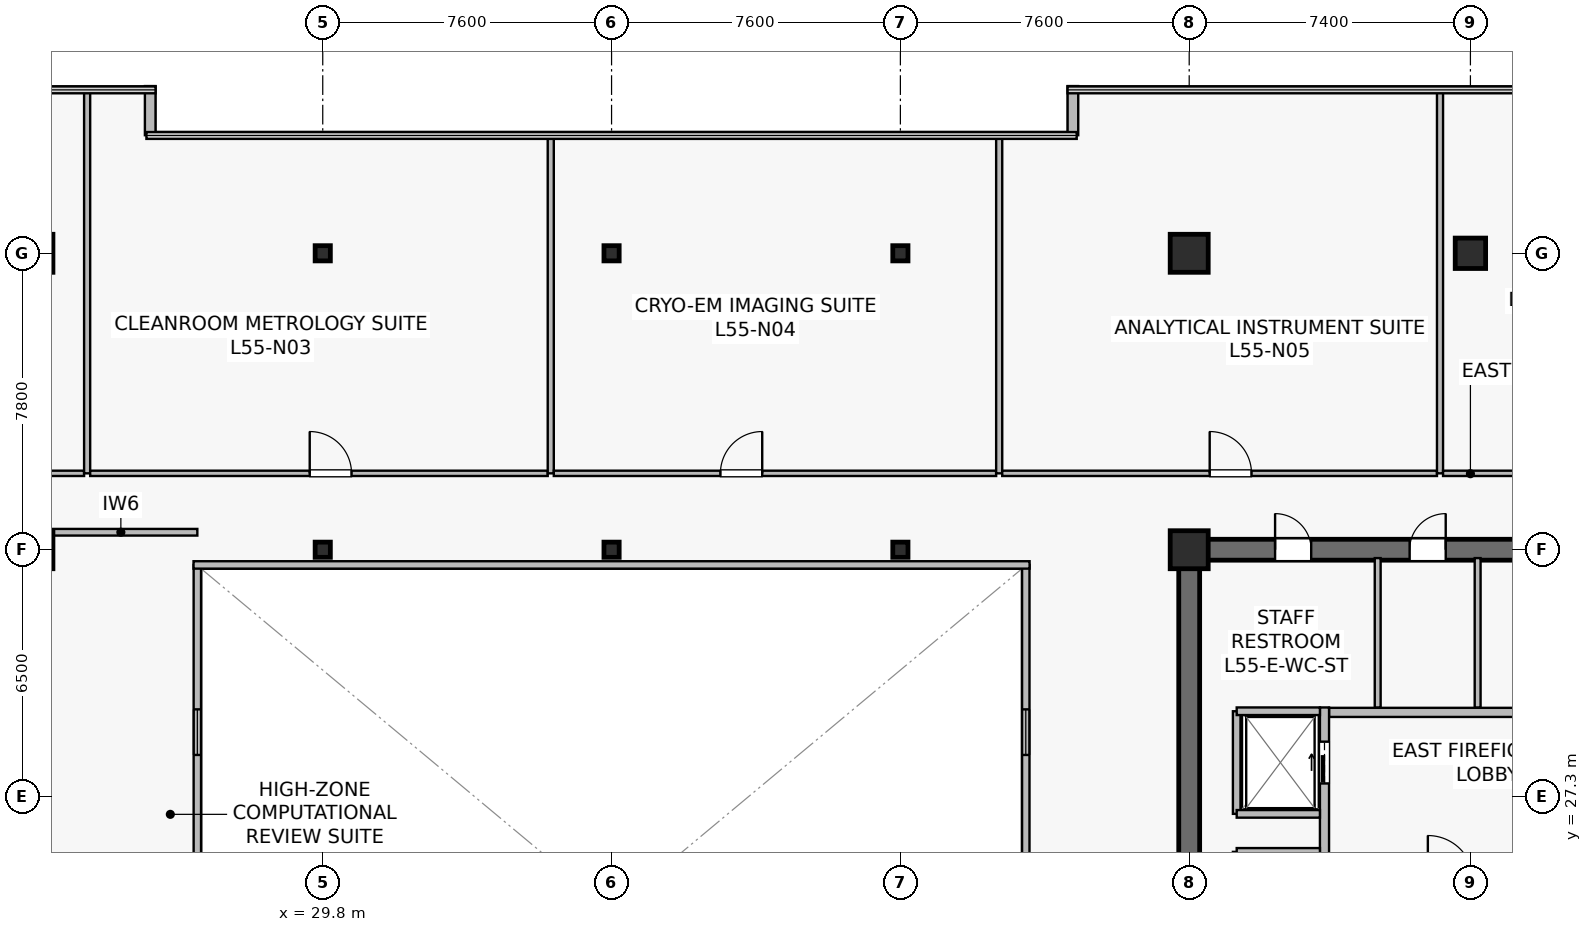
"""IFC4 building model, lengths in metres.
Left out: names, types, materials, properties, quantities, classifications, styles, units other than length and angle.
Written with IfcOpenShell. Run it as: python <this file> out.ifc"""

import sys

from ifc_helpers import new_model, si_unit, direction, frame, frame_2d, origin, origin_2d, place, context, subcontext, project, spatial, rectangle, hollow_rectangle, extrude, source, transform, mapped, element, fill, save


model = new_model("IFC4")
c1 = context("Model", 3, precision=1e-05, world=origin(), true_north=direction((0.0, 1.0)))
c2 = subcontext(c1, "Body", "Model", "MODEL_VIEW")
j1 = project(units=[si_unit("LENGTHUNIT", "METRE"), si_unit("PLANEANGLEUNIT", "RADIAN")], contexts=[c1])
p1 = place(None, origin())
s1 = spatial("IfcSite", under=j1, at=p1, CompositionType="ELEMENT")
p2 = place(p1, origin())
s2 = spatial("IfcBuilding", under=s1, at=p2, CompositionType="ELEMENT")
p3 = place(p2, frame((0.0, 0.0, 230.1)))
s3 = spatial("IfcBuildingStorey", under=s2, at=p3, CompositionType="ELEMENT", Elevation=230.1)
p4 = place(p3, frame((52.325, 33.8, 0.0), z_axis=(0.0, 0.0, 1.0), x_axis=(1.0, 0.0, 0.0)))
e1 = element("IfcWall", 1, at=p4, inside=s3, PredefinedType="SHEAR", context=c2, shape_type="SweptSolid", body=[
    extrude(rectangle(XDim=15.35, YDim=0.55, at=frame_2d((7.675, 0.0))), origin(), (0.0, 0.0, 1.0), 3.8),
])
p5 = place(p4, frame((6.075, 0.0, 0.0)))
e2 = element("IfcOpeningElement", 2, at=p5, cuts=e1, PredefinedType="OPENING", context=c2, shape_type="SweptSolid", body=[
    extrude(rectangle(XDim=0.95, YDim=2.15, at=frame_2d((0.475, 1.075))), frame((0.0, 0.285, 0.0), z_axis=(0.0, -1.0, 0.0), x_axis=(1.0, 0.0, 0.0)), (0.0, 0.0, 1.0), 0.57),
])
p6 = place(p4, frame((2.535, 0.0, 0.0)))
e3 = element("IfcOpeningElement", 3, at=p6, cuts=e1, PredefinedType="OPENING", context=c2, shape_type="SweptSolid", body=[
    extrude(rectangle(XDim=0.95, YDim=2.15, at=frame_2d((0.475, 1.075))), frame((0.0, 0.285, 0.0), z_axis=(0.0, -1.0, 0.0), x_axis=(1.0, 0.0, 0.0)), (0.0, 0.0, 1.0), 0.57),
])
p7 = place(p3, frame((52.6, 15.075, 0.0), z_axis=(0.0, 0.0, 1.0), x_axis=(0.0, 1.0, 0.0)))
e4 = element("IfcWall", 4, at=p7, inside=s3, PredefinedType="SHEAR", context=c2, shape_type="SweptSolid", body=[
    extrude(rectangle(XDim=18.45, YDim=0.55, at=frame_2d((9.225, 0.0))), origin(), (0.0, 0.0, 1.0), 3.8),
])
p8 = place(p7, frame((3.475, 0.0, 0.0)))
e5 = element("IfcOpeningElement", 5, at=p8, cuts=e4, PredefinedType="OPENING", context=c2, shape_type="SweptSolid", body=[
    extrude(rectangle(XDim=1.42, YDim=2.2, at=frame_2d((0.71, 1.1))), frame((0.0, 0.285, 0.0), z_axis=(0.0, -1.0, 0.0), x_axis=(1.0, 0.0, 0.0)), (0.0, 0.0, 1.0), 0.57),
])
m1 = source(origin(), c2, "Body", "SweptSolid", [
    extrude(rectangle(XDim=1.0, YDim=1.0, at=origin_2d()), origin(), (0.0, 0.0, 1.0), 4.1),
])
for number, where, z_axis, x_axis in (
    (6, (22.2, 33.8, 0.0), (0.0, 0.0, 1.0), (1.0, 0.0, 0.0)),
    (7, (22.2, 41.6, 0.0), (0.0, 0.0, 1.0), (1.0, 0.0, 0.0)),
    (8, (52.6, 33.8, 0.0), (0.0, 0.0, 1.0), (1.0, 0.0, 0.0)),
    (9, (52.6, 41.6, 0.0), (0.0, 0.0, 1.0), (1.0, 0.0, 0.0)),
):
    element("IfcColumn", number, at=place(p3, frame(where, z_axis=z_axis, x_axis=x_axis)), inside=s3, PredefinedType="COLUMN", context=c2, shape_type="MappedRepresentation", body=[
        mapped(m1, transform((0.0, 0.0, 0.0), scale=1.0)),
    ])
m2 = source(origin(), c2, "Body", "SweptSolid", [
    extrude(rectangle(XDim=0.8, YDim=0.8, at=origin_2d()), origin(), (0.0, 0.0, 1.0), 4.1),
])
p9 = place(p3, frame((60.0, 41.6, 0.0), z_axis=(0.0, 0.0, 1.0), x_axis=(1.0, 0.0, 0.0)))
e10 = element("IfcColumn", 10, at=p9, inside=s3, PredefinedType="COLUMN", context=c2, shape_type="MappedRepresentation", body=[
    mapped(m2, transform((0.0, 0.0, 0.0), scale=1.0)),
])
m3 = source(origin(), c2, "Body", "SweptSolid", [
    extrude(hollow_rectangle(XDim=0.4, YDim=0.4, WallThickness=0.019, at=origin_2d()), origin(), (0.0, 0.0, 1.0), 4.1),
])
for number, where, z_axis, x_axis in (
    (11, (29.8, 33.8, 0.0), (0.0, 0.0, 1.0), (1.0, 0.0, 0.0)),
    (12, (29.8, 41.6, 0.0), (0.0, 0.0, 1.0), (1.0, 0.0, 0.0)),
    (13, (37.4, 33.8, 0.0), (0.0, 0.0, 1.0), (1.0, 0.0, 0.0)),
    (14, (37.4, 41.6, 0.0), (0.0, 0.0, 1.0), (1.0, 0.0, 0.0)),
    (15, (45.0, 33.8, 0.0), (0.0, 0.0, 1.0), (1.0, 0.0, 0.0)),
    (16, (45.0, 41.6, 0.0), (0.0, 0.0, 1.0), (1.0, 0.0, 0.0)),
):
    element("IfcColumn", number, at=place(p3, frame(where, z_axis=z_axis, x_axis=x_axis)), inside=s3, PredefinedType="COLUMN", context=c2, shape_type="MappedRepresentation", body=[
        mapped(m3, transform((0.0, 0.0, 0.0), scale=1.0)),
    ])
for number, where, z_axis, x_axis in (
    (17, (49.54, 46.0, 0.0), (0.0, 0.0, 1.0), (0.0, -1.0, 0.0)),
    (18, (25.26, 44.707, 0.0), (0.0, 0.0, 1.0), (0.0, 1.0, 0.0)),
):
    element("IfcWall", number, at=place(p3, frame(where, z_axis=z_axis, x_axis=x_axis)), inside=s3, PredefinedType="STANDARD", context=c2, shape_type="SweptSolid", body=[
        extrude(rectangle(XDim=1.293, YDim=0.28, at=frame_2d((0.646, 0.0))), origin(), (0.0, 0.0, 1.0), 3.8),
    ])
p10 = place(p3, frame((56.28, 29.52, 0.0), z_axis=(0.0, 0.0, 1.0), x_axis=(1.0, 0.0, 0.0)))
e19 = element("IfcWall", 19, at=p10, inside=s3, PredefinedType="SOLIDWALL", context=c2, shape_type="SweptSolid", body=[
    extrude(rectangle(XDim=6.92, YDim=0.24, at=frame_2d((3.46, 0.0))), origin(), (0.0, 0.0, 1.0), 3.197),
])
p11 = place(p3, frame((56.16, 22.8, 0.0), z_axis=(0.0, 0.0, 1.0), x_axis=(0.0, 1.0, 0.0)))
e20 = element("IfcWall", 20, at=p11, inside=s3, PredefinedType="SOLIDWALL", context=c2, shape_type="SweptSolid", body=[
    extrude(rectangle(XDim=6.85, YDim=0.24, at=frame_2d((3.425, 0.0))), origin(), (0.0, 0.0, 1.0), 2.935),
])
p12 = place(p11, frame((4.85, 0.0, 0.0)))
e21 = element("IfcOpeningElement", 21, at=p12, cuts=e20, PredefinedType="OPENING", context=c2, shape_type="SweptSolid", body=[
    extrude(rectangle(XDim=1.1, YDim=2.22, at=frame_2d((0.55, 1.11))), frame((0.0, 0.13, 0.0), z_axis=(0.0, -1.0, 0.0), x_axis=(1.0, 0.0, 0.0)), (0.0, 0.0, 1.0), 0.26),
])
p13 = place(p11, frame((1.0, 0.0, 0.0)))
e22 = element("IfcOpeningElement", 22, at=p13, cuts=e20, PredefinedType="OPENING", context=c2, shape_type="SweptSolid", body=[
    extrude(rectangle(XDim=1.2, YDim=2.22, at=frame_2d((0.6, 1.11))), frame((0.0, 0.13, 0.0), z_axis=(0.0, -1.0, 0.0), x_axis=(1.0, 0.0, 0.0)), (0.0, 0.0, 1.0), 0.26),
])
p14 = place(p3, frame((53.85, 26.85, 0.0), z_axis=(0.0, 0.0, 1.0), x_axis=(0.0, 1.0, 0.0)))
e23 = element("IfcWall", 23, at=p14, inside=s3, PredefinedType="SOLIDWALL", context=c2, shape_type="SweptSolid", body=[
    extrude(rectangle(XDim=2.7, YDim=0.2, at=frame_2d((1.35, 0.0))), origin(), (0.0, 0.0, 1.0), 3.8),
])
p15 = place(p3, frame((53.85, 29.55, 0.0), z_axis=(0.0, 0.0, 1.0), x_axis=(1.0, 0.0, 0.0)))
e24 = element("IfcWall", 24, at=p15, inside=s3, PredefinedType="SOLIDWALL", context=c2, shape_type="SweptSolid", body=[
    extrude(rectangle(XDim=2.19, YDim=0.2, at=frame_2d((1.095, 0.0))), origin(), (0.0, 0.0, 1.0), 3.8),
])
p16 = place(p3, frame((53.85, 26.85, 0.0), z_axis=(0.0, 0.0, 1.0), x_axis=(1.0, 0.0, 0.0)))
e25 = element("IfcWall", 25, at=p16, inside=s3, PredefinedType="SOLIDWALL", context=c2, shape_type="SweptSolid", body=[
    extrude(rectangle(XDim=2.19, YDim=0.2, at=frame_2d((1.095, 0.0))), origin(), (0.0, 0.0, 1.0), 3.197),
])
p17 = place(p3, frame((53.85, 22.95, 0.0), z_axis=(0.0, 0.0, 1.0), x_axis=(0.0, 1.0, 0.0)))
e26 = element("IfcWall", 26, at=p17, inside=s3, PredefinedType="SOLIDWALL", context=c2, shape_type="SweptSolid", body=[
    extrude(rectangle(XDim=2.9, YDim=0.2, at=frame_2d((1.45, 0.0))), origin(), (0.0, 0.0, 1.0), 2.935),
])
p18 = place(p3, frame((53.85, 25.85, 0.0), z_axis=(0.0, 0.0, 1.0), x_axis=(1.0, 0.0, 0.0)))
e27 = element("IfcWall", 27, at=p18, inside=s3, PredefinedType="SOLIDWALL", context=c2, shape_type="SweptSolid", body=[
    extrude(rectangle(XDim=2.19, YDim=0.2, at=frame_2d((1.095, 0.0))), origin(), (0.0, 0.0, 1.0), 3.8),
])
p19 = place(p3, frame((60.19, 29.65, 0.0), z_axis=(0.0, 0.0, 1.0), x_axis=(0.0, 1.0, 0.0)))
e28 = element("IfcWall", 28, at=p19, inside=s3, PredefinedType="PLUMBINGWALL", context=c2, shape_type="SweptSolid", body=[
    extrude(rectangle(XDim=3.93, YDim=0.155, at=frame_2d((1.965, 0.0))), origin(), (0.0, 0.0, 1.0), 3.197),
])
p20 = place(p3, frame((57.56, 29.65, 0.0), z_axis=(0.0, 0.0, 1.0), x_axis=(0.0, 1.0, 0.0)))
e29 = element("IfcWall", 29, at=p20, inside=s3, PredefinedType="PLUMBINGWALL", context=c2, shape_type="SweptSolid", body=[
    extrude(rectangle(XDim=3.93, YDim=0.155, at=frame_2d((1.965, 0.0))), origin(), (0.0, 0.0, 1.0), 3.8),
])
p21 = place(p3, frame((22.475, 34.26, 0.0), z_axis=(0.0, 0.0, 1.0), x_axis=(1.0, 0.0, 0.0)))
e30 = element("IfcWall", 30, at=p21, inside=s3, PredefinedType="PARTITIONING", context=c2, shape_type="SweptSolid", body=[
    extrude(rectangle(XDim=4.025, YDim=0.175, at=frame_2d((2.012, 0.0))), origin(), (0.0, 0.0, 1.0), 3.485),
])
p22 = place(p3, frame((26.5, 15.2, 0.0), z_axis=(0.0, 0.0, 1.0), x_axis=(0.0, 1.0, 0.0)))
e31 = element("IfcWall", 31, at=p22, inside=s3, PredefinedType="SOLIDWALL", context=c2, shape_type="SweptSolid", body=[
    extrude(rectangle(XDim=18.2, YDim=0.195, at=frame_2d((9.1, 0.0))), origin(), (0.0, 0.0, 1.0), 3.8),
])
p23 = place(p22, frame((1.8, 0.0, 0.9)))
e32 = element("IfcOpeningElement", 32, at=p23, cuts=e31, PredefinedType="OPENING", context=c2, shape_type="SweptSolid", body=[
    extrude(rectangle(XDim=1.2, YDim=1.35, at=frame_2d((0.6, 0.675))), frame((0.0, 0.107, 0.0), z_axis=(0.0, -1.0, 0.0), x_axis=(1.0, 0.0, 0.0)), (0.0, 0.0, 1.0), 0.215),
])
p24 = place(p22, frame((13.2, 0.0, 0.9)))
e33 = element("IfcOpeningElement", 33, at=p24, cuts=e31, PredefinedType="OPENING", context=c2, shape_type="SweptSolid", body=[
    extrude(rectangle(XDim=1.2, YDim=1.35, at=frame_2d((0.6, 0.675))), frame((0.0, 0.107, 0.0), z_axis=(0.0, -1.0, 0.0), x_axis=(1.0, 0.0, 0.0)), (0.0, 0.0, 1.0), 0.215),
])
p25 = place(p3, frame((48.3, 15.2, 0.0), z_axis=(0.0, 0.0, 1.0), x_axis=(0.0, 1.0, 0.0)))
e34 = element("IfcWall", 34, at=p25, inside=s3, PredefinedType="SOLIDWALL", context=c2, shape_type="SweptSolid", body=[
    extrude(rectangle(XDim=18.2, YDim=0.195, at=frame_2d((9.1, 0.0))), origin(), (0.0, 0.0, 1.0), 3.8),
])
p26 = place(p25, frame((1.8, 0.0, 0.9)))
e35 = element("IfcOpeningElement", 35, at=p26, cuts=e34, PredefinedType="OPENING", context=c2, shape_type="SweptSolid", body=[
    extrude(rectangle(XDim=1.2, YDim=1.35, at=frame_2d((0.6, 0.675))), frame((0.0, 0.107, 0.0), z_axis=(0.0, -1.0, 0.0), x_axis=(1.0, 0.0, 0.0)), (0.0, 0.0, 1.0), 0.215),
])
p27 = place(p25, frame((13.2, 0.0, 0.9)))
e36 = element("IfcOpeningElement", 36, at=p27, cuts=e34, PredefinedType="OPENING", context=c2, shape_type="SweptSolid", body=[
    extrude(rectangle(XDim=1.2, YDim=1.35, at=frame_2d((0.6, 0.675))), frame((0.0, 0.107, 0.0), z_axis=(0.0, -1.0, 0.0), x_axis=(1.0, 0.0, 0.0)), (0.0, 0.0, 1.0), 0.215),
])
p28 = place(p3, frame((26.4, 33.4, 0.0), z_axis=(0.0, 0.0, 1.0), x_axis=(1.0, 0.0, 0.0)))
e37 = element("IfcWall", 37, at=p28, inside=s3, PredefinedType="SOLIDWALL", context=c2, shape_type="SweptSolid", body=[
    extrude(rectangle(XDim=22.0, YDim=0.195, at=frame_2d((11.0, 0.0))), origin(), (0.0, 0.0, 1.0), 3.8),
])
p29 = place(p3, frame((12.88, 35.81, 0.0), z_axis=(0.0, 0.0, 1.0), x_axis=(1.0, 0.0, 0.0)))
e38 = element("IfcWall", 38, at=p29, inside=s3, PredefinedType="PARTITIONING", context=c2, shape_type="SweptSolid", body=[
    extrude(rectangle(XDim=10.64, YDim=0.14, at=frame_2d((5.32, 0.0))), origin(), (0.0, 0.0, 1.0), 3.197),
])
p30 = place(p29, frame((3.974, 0.0, 0.0)))
e39 = element("IfcOpeningElement", 39, at=p30, cuts=e38, PredefinedType="OPENING", context=c2, shape_type="SweptSolid", body=[
    extrude(rectangle(XDim=1.1, YDim=2.18, at=frame_2d((0.55, 1.09))), frame((0.0, 0.08, 0.0), z_axis=(0.0, -1.0, 0.0), x_axis=(1.0, 0.0, 0.0)), (0.0, 0.0, 1.0), 0.16),
])
p31 = place(p3, frame((23.6, 35.81, 0.0), z_axis=(0.0, 0.0, 1.0), x_axis=(0.0, 1.0, 0.0)))
e40 = element("IfcWall", 40, at=p31, inside=s3, PredefinedType="PARTITIONING", context=c2, shape_type="SweptSolid", body=[
    extrude(rectangle(XDim=10.08, YDim=0.16, at=frame_2d((5.04, 0.0))), origin(), (0.0, 0.0, 1.0), 3.135),
])
p32 = place(p3, frame((23.68, 35.81, 0.0), z_axis=(0.0, 0.0, 1.0), x_axis=(1.0, 0.0, 0.0)))
e41 = element("IfcWall", 41, at=p32, inside=s3, PredefinedType="PARTITIONING", context=c2, shape_type="SweptSolid", body=[
    extrude(rectangle(XDim=12.04, YDim=0.14, at=frame_2d((6.02, 0.0))), origin(), (0.0, 0.0, 1.0), 3.197),
])
p33 = place(p32, frame((5.777, 0.0, 0.0)))
e42 = element("IfcOpeningElement", 42, at=p33, cuts=e41, PredefinedType="OPENING", context=c2, shape_type="SweptSolid", body=[
    extrude(rectangle(XDim=1.1, YDim=2.18, at=frame_2d((0.55, 1.09))), frame((0.0, 0.08, 0.0), z_axis=(0.0, -1.0, 0.0), x_axis=(1.0, 0.0, 0.0)), (0.0, 0.0, 1.0), 0.16),
])
p34 = place(p3, frame((35.8, 35.81, 0.0), z_axis=(0.0, 0.0, 1.0), x_axis=(0.0, 1.0, 0.0)))
e43 = element("IfcWall", 43, at=p34, inside=s3, PredefinedType="PARTITIONING", context=c2, shape_type="SweptSolid", body=[
    extrude(rectangle(XDim=8.88, YDim=0.16, at=frame_2d((4.44, 0.0))), origin(), (0.0, 0.0, 1.0), 3.135),
])
p35 = place(p3, frame((35.88, 35.81, 0.0), z_axis=(0.0, 0.0, 1.0), x_axis=(1.0, 0.0, 0.0)))
e44 = element("IfcWall", 44, at=p35, inside=s3, PredefinedType="PARTITIONING", context=c2, shape_type="SweptSolid", body=[
    extrude(rectangle(XDim=11.64, YDim=0.14, at=frame_2d((5.82, 0.0))), origin(), (0.0, 0.0, 1.0), 3.197),
])
p36 = place(p35, frame((4.385, 0.0, 0.0)))
e45 = element("IfcOpeningElement", 45, at=p36, cuts=e44, PredefinedType="OPENING", context=c2, shape_type="SweptSolid", body=[
    extrude(rectangle(XDim=1.1, YDim=2.18, at=frame_2d((0.55, 1.09))), frame((0.0, 0.08, 0.0), z_axis=(0.0, -1.0, 0.0), x_axis=(1.0, 0.0, 0.0)), (0.0, 0.0, 1.0), 0.16),
])
p37 = place(p3, frame((47.6, 35.81, 0.0), z_axis=(0.0, 0.0, 1.0), x_axis=(0.0, 1.0, 0.0)))
e46 = element("IfcWall", 46, at=p37, inside=s3, PredefinedType="PARTITIONING", context=c2, shape_type="SweptSolid", body=[
    extrude(rectangle(XDim=8.88, YDim=0.16, at=frame_2d((4.44, 0.0))), origin(), (0.0, 0.0, 1.0), 3.135),
])
p38 = place(p3, frame((47.68, 35.81, 0.0), z_axis=(0.0, 0.0, 1.0), x_axis=(1.0, 0.0, 0.0)))
e47 = element("IfcWall", 47, at=p38, inside=s3, PredefinedType="PARTITIONING", context=c2, shape_type="SweptSolid", body=[
    extrude(rectangle(XDim=11.44, YDim=0.14, at=frame_2d((5.72, 0.0))), origin(), (0.0, 0.0, 1.0), 3.197),
])
p39 = place(p38, frame((5.459, 0.0, 0.0)))
e48 = element("IfcOpeningElement", 48, at=p39, cuts=e47, PredefinedType="OPENING", context=c2, shape_type="SweptSolid", body=[
    extrude(rectangle(XDim=1.1, YDim=2.18, at=frame_2d((0.55, 1.09))), frame((0.0, 0.08, 0.0), z_axis=(0.0, -1.0, 0.0), x_axis=(1.0, 0.0, 0.0)), (0.0, 0.0, 1.0), 0.16),
])
p40 = place(p3, frame((59.2, 35.81, 0.0), z_axis=(0.0, 0.0, 1.0), x_axis=(0.0, 1.0, 0.0)))
e49 = element("IfcWall", 49, at=p40, inside=s3, PredefinedType="PARTITIONING", context=c2, shape_type="SweptSolid", body=[
    extrude(rectangle(XDim=10.08, YDim=0.16, at=frame_2d((5.04, 0.0))), origin(), (0.0, 0.0, 1.0), 3.135),
])
p41 = place(p3, frame((59.28, 35.81, 0.0), z_axis=(0.0, 0.0, 1.0), x_axis=(1.0, 0.0, 0.0)))
e50 = element("IfcWall", 50, at=p41, inside=s3, PredefinedType="PARTITIONING", context=c2, shape_type="SweptSolid", body=[
    extrude(rectangle(XDim=8.21, YDim=0.14, at=frame_2d((4.105, 0.0))), origin(), (0.0, 0.0, 1.0), 3.197),
])
p42 = place(p41, frame((2.978, 0.0, 0.0)))
e51 = element("IfcOpeningElement", 51, at=p42, cuts=e50, PredefinedType="OPENING", context=c2, shape_type="SweptSolid", body=[
    extrude(rectangle(XDim=1.1, YDim=2.18, at=frame_2d((0.55, 1.09))), frame((0.0, 0.08, 0.0), z_axis=(0.0, -1.0, 0.0), x_axis=(1.0, 0.0, 0.0)), (0.0, 0.0, 1.0), 0.16),
])
m4 = source(origin(), c2, "Body", "SweptSolid", [
    extrude(rectangle(XDim=1.2, YDim=1.35, at=frame_2d((0.6, 0.675))), frame((0.0, 0.03, 0.0), z_axis=(0.0, -1.0, 0.0), x_axis=(1.0, 0.0, 0.0)), (0.0, 0.0, 1.0), 0.06),
])
p43 = place(p24, origin())
e52 = element("IfcWindow", 52, at=p43, inside=s3, PartitioningType="SINGLE_PANEL", PredefinedType="WINDOW", context=c2, shape_type="MappedRepresentation", body=[
    mapped(m4, transform((0.0, 0.0, 0.0), scale=1.0)),
])
fill(e33, e52)
p44 = place(p27, origin())
e53 = element("IfcWindow", 53, at=p44, inside=s3, PartitioningType="SINGLE_PANEL", PredefinedType="WINDOW", context=c2, shape_type="MappedRepresentation", body=[
    mapped(m4, transform((0.0, 0.0, 0.0), scale=1.0)),
])
fill(e36, e53)
m5 = source(origin(), c2, "Body", "SweptSolid", [
    extrude(rectangle(XDim=1.1, YDim=2.22, at=frame_2d((0.55, 1.11))), frame((0.0, 0.025, 0.0), z_axis=(0.0, -1.0, 0.0), x_axis=(1.0, 0.0, 0.0)), (0.0, 0.0, 1.0), 0.05),
])
p45 = place(p12, origin())
e54 = element("IfcDoor", 54, at=p45, inside=s3, OperationType="SLIDING_TO_RIGHT", PredefinedType="USERDEFINED", context=c2, shape_type="MappedRepresentation", body=[
    mapped(m5, transform((0.0, 0.0, 0.0), scale=1.0)),
])
fill(e21, e54)
m6 = source(origin(), c2, "Body", "SweptSolid", [
    extrude(rectangle(XDim=0.95, YDim=2.15, at=frame_2d((0.475, 1.075))), frame((0.0, 0.025, 0.0), z_axis=(0.0, -1.0, 0.0), x_axis=(1.0, 0.0, 0.0)), (0.0, 0.0, 1.0), 0.05),
])
p46 = place(p5, origin())
e55 = element("IfcDoor", 55, at=p46, inside=s3, OperationType="SINGLE_SWING_RIGHT", PredefinedType="DOOR", context=c2, shape_type="MappedRepresentation", body=[
    mapped(m6, transform((0.0, 0.0, 0.0), scale=1.0)),
])
fill(e2, e55)
p47 = place(p6, origin())
e56 = element("IfcDoor", 56, at=p47, inside=s3, OperationType="SINGLE_SWING_LEFT", PredefinedType="DOOR", context=c2, shape_type="MappedRepresentation", body=[
    mapped(m6, transform((0.0, 0.0, 0.0), scale=1.0)),
])
fill(e3, e56)
m7 = source(origin(), c2, "Body", "SweptSolid", [
    extrude(rectangle(XDim=1.1, YDim=2.18, at=frame_2d((0.55, 1.09))), frame((0.0, 0.025, 0.0), z_axis=(0.0, -1.0, 0.0), x_axis=(1.0, 0.0, 0.0)), (0.0, 0.0, 1.0), 0.05),
])
p48 = place(p33, origin())
e57 = element("IfcDoor", 57, at=p48, inside=s3, OperationType="SINGLE_SWING_LEFT", PredefinedType="DOOR", context=c2, shape_type="MappedRepresentation", body=[
    mapped(m7, transform((0.0, 0.0, 0.0), scale=1.0)),
])
fill(e42, e57)
p49 = place(p36, origin())
e58 = element("IfcDoor", 58, at=p49, inside=s3, OperationType="SINGLE_SWING_RIGHT", PredefinedType="DOOR", context=c2, shape_type="MappedRepresentation", body=[
    mapped(m7, transform((0.0, 0.0, 0.0), scale=1.0)),
])
fill(e45, e58)
p50 = place(p39, origin())
e59 = element("IfcDoor", 59, at=p50, inside=s3, OperationType="SINGLE_SWING_LEFT", PredefinedType="DOOR", context=c2, shape_type="MappedRepresentation", body=[
    mapped(m7, transform((0.0, 0.0, 0.0), scale=1.0)),
])
fill(e48, e59)
save(model, sys.argv[1])
